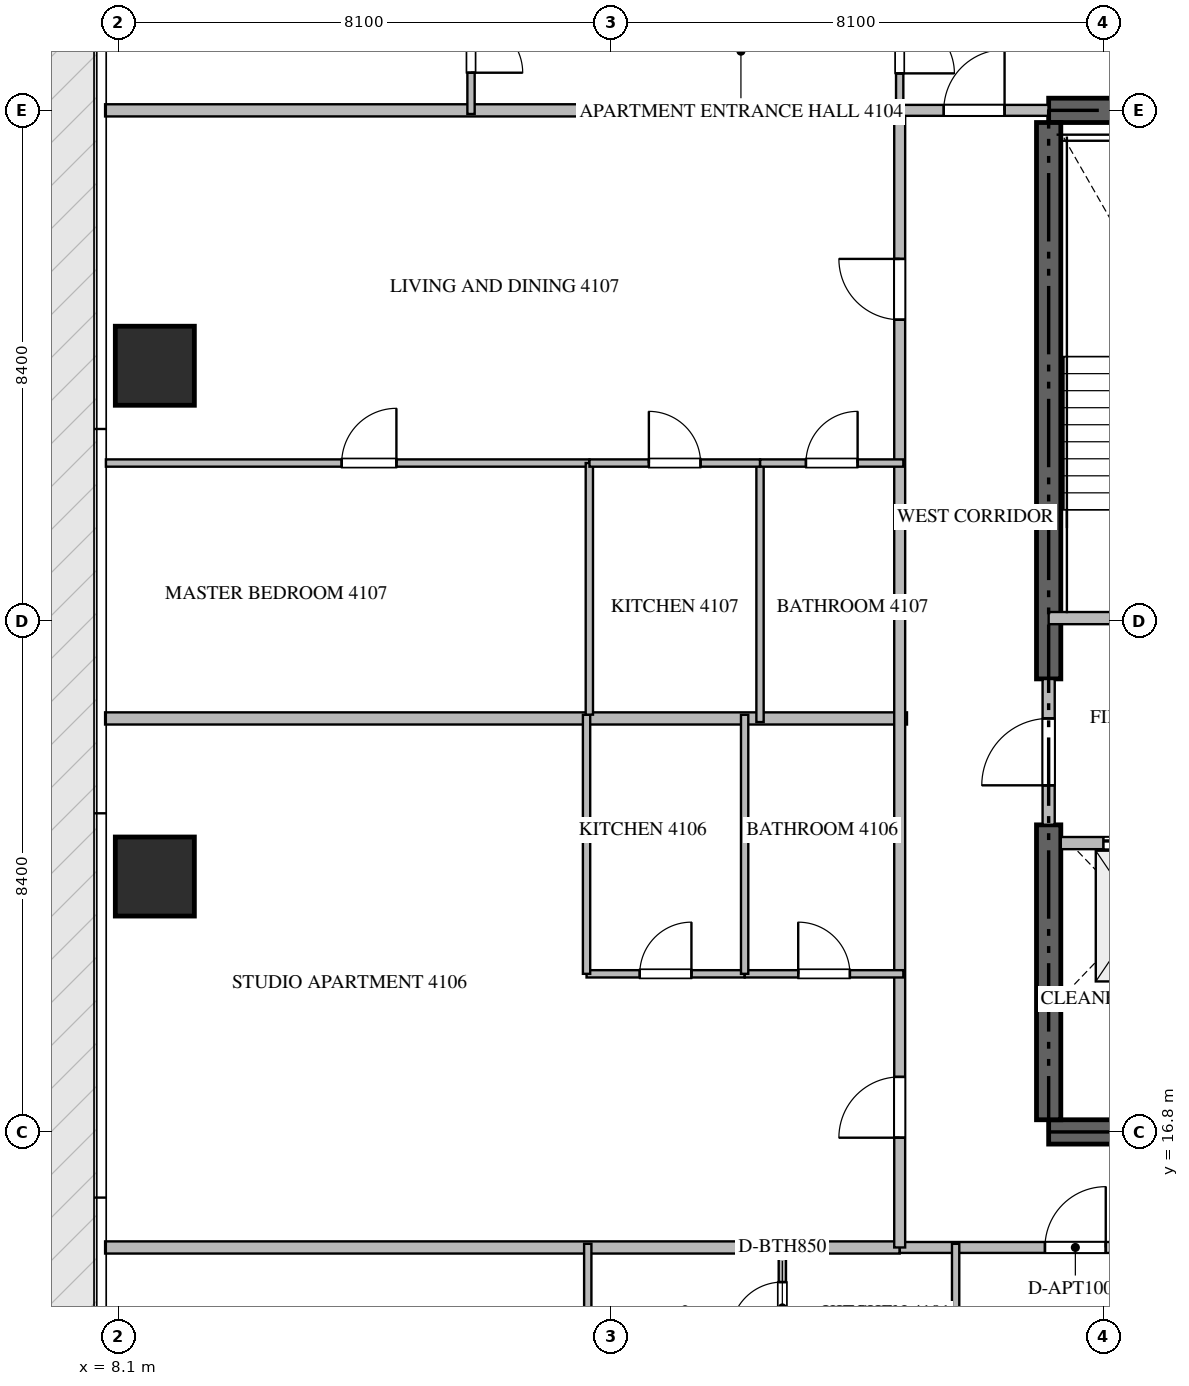
"""IFC4 building model, lengths in metres.
Left out: names, types, materials, properties, quantities, classifications, styles, units other than length and angle.
Written with IfcOpenShell. Run it as: python <this file> out.ifc"""

import sys

from ifc_helpers import new_model, si_unit, direction, frame, frame_2d, origin, origin_2d, place, context, subcontext, project, spatial, rectangle, extrude, source, transform, mapped, element, fill, save


model = new_model("IFC4")
c1 = context("Model", 3, precision=1e-05, world=origin(), true_north=direction((0.0, 1.0)))
c2 = subcontext(c1, "Body", "Model", "MODEL_VIEW")
j1 = project(units=[si_unit("LENGTHUNIT", "METRE"), si_unit("PLANEANGLEUNIT", "RADIAN")], contexts=[c1])
p1 = place(None, origin())
s1 = spatial("IfcSite", under=j1, at=p1, CompositionType="ELEMENT")
p2 = place(p1, origin())
s2 = spatial("IfcBuilding", under=s1, at=p2, CompositionType="ELEMENT")
p3 = place(p2, frame((0.0, 0.0, 165.15)))
s3 = spatial("IfcBuildingStorey", under=s2, at=p3, CompositionType="ELEMENT", Elevation=165.15)
for number, where, z_axis, x_axis in (
    (1, (23.4, 16.8, -0.26), (0.0, 0.0, 1.0), (1.0, 0.0, 0.0)),
    (2, (41.4, 33.6, -0.26), (0.0, 0.0, 1.0), (-1.0, 0.0, 0.0)),
):
    element("IfcWall", number, at=place(p3, frame(where, z_axis=z_axis, x_axis=x_axis)), inside=s3, PredefinedType="SHEAR", context=c2, shape_type="SweptSolid", body=[
        extrude(rectangle(XDim=18.0, YDim=0.4, at=frame_2d((9.0, 0.0))), origin(), (0.0, 0.0, 1.0), 3.748),
    ])
p4 = place(p3, frame((23.4, 17.0, -0.26), z_axis=(0.0, 0.0, 1.0), x_axis=(0.0, 1.0, 0.0)))
e3 = element("IfcWall", 3, at=p4, inside=s3, PredefinedType="SHEAR", context=c2, shape_type="SweptSolid", body=[
    extrude(rectangle(XDim=4.85, YDim=0.4, at=frame_2d((2.425, 0.0))), origin(), (0.0, 0.0, 1.0), 3.748),
])
p5 = place(p3, frame((23.4, 24.25, -0.26), z_axis=(0.0, 0.0, 1.0), x_axis=(0.0, 1.0, 0.0)))
e4 = element("IfcWall", 4, at=p5, inside=s3, PredefinedType="SHEAR", context=c2, shape_type="SweptSolid", body=[
    extrude(rectangle(XDim=9.15, YDim=0.4, at=frame_2d((4.575, 0.0))), origin(), (0.0, 0.0, 1.0), 3.748),
])
m1 = source(origin(), c2, "Body", "SweptSolid", [
    extrude(rectangle(XDim=1.3, YDim=1.3, at=origin_2d()), origin(), (0.0, 0.0, 1.0), 3.75),
])
for number, where, z_axis, x_axis in (
    (5, (8.7, 21.0, -0.26), (0.0, 0.0, 1.0), (1.0, 0.0, 0.0)),
    (6, (8.7, 29.4, -0.26), (0.0, 0.0, 1.0), (1.0, 0.0, 0.0)),
):
    element("IfcColumn", number, at=place(p3, frame(where, z_axis=z_axis, x_axis=x_axis)), inside=s3, PredefinedType="COLUMN", context=c2, shape_type="MappedRepresentation", body=[
        mapped(m1, transform((0.0, 0.0, 0.0), scale=1.0)),
    ])
p6 = place(p3, frame((23.4, 25.25, 0.0), z_axis=(0.0, 0.0, 1.0), x_axis=(1.0, 0.0, 0.0)))
e7 = element("IfcWall", 7, at=p6, inside=s3, PredefinedType="STANDARD", context=c2, shape_type="SweptSolid", body=[
    extrude(rectangle(XDim=4.45, YDim=0.2, at=frame_2d((2.225, 0.0))), origin(), (0.0, 0.0, 1.0), 3.49),
])
p7 = place(p6, frame((1.65, 0.0, 0.0)))
e8 = element("IfcOpeningElement", 8, at=p7, cuts=e7, PredefinedType="OPENING", context=c2, shape_type="SweptSolid", body=[
    extrude(rectangle(XDim=1.1, YDim=2.15, at=frame_2d((0.55, 1.075))), frame((0.0, 0.11, 0.0), z_axis=(0.0, -1.0, 0.0), x_axis=(1.0, 0.0, 0.0)), (0.0, 0.0, 1.0), 0.22),
])
p8 = place(p3, frame((23.6, 21.55, 0.0), z_axis=(0.0, 0.0, 1.0), x_axis=(1.0, 0.0, 0.0)))
e9 = element("IfcWall", 9, at=p8, inside=s3, PredefinedType="STANDARD", context=c2, shape_type="SweptSolid", body=[
    extrude(rectangle(XDim=2.45, YDim=0.2, at=frame_2d((1.225, 0.0))), origin(), (0.0, 0.0, 1.0), 3.49),
])
p9 = place(p8, frame((0.7, 0.0, 0.0)))
e10 = element("IfcOpeningElement", 10, at=p9, cuts=e9, PredefinedType="OPENING", context=c2, shape_type="SweptSolid", body=[
    extrude(rectangle(XDim=1.2, YDim=2.2, at=frame_2d((0.6, 1.1))), frame((0.0, 0.11, 0.0), z_axis=(0.0, -1.0, 0.0), x_axis=(1.0, 0.0, 0.0)), (0.0, 0.0, 1.0), 0.22),
])
p10 = place(p3, frame((23.6, 19.05, 0.0), z_axis=(0.0, 0.0, 1.0), x_axis=(1.0, 0.0, 0.0)))
e11 = element("IfcWall", 11, at=p10, inside=s3, PredefinedType="STANDARD", context=c2, shape_type="SweptSolid", body=[
    extrude(rectangle(XDim=2.45, YDim=0.2, at=frame_2d((1.225, 0.0))), origin(), (0.0, 0.0, 1.0), 3.49),
])
p11 = place(p3, frame((23.4, 21.852, 0.0), z_axis=(0.0, 0.0, 1.0), x_axis=(0.0, 1.0, 0.0)))
e12 = element("IfcWall", 12, at=p11, inside=s3, PredefinedType="STANDARD", context=c2, shape_type="SweptSolid", body=[
    extrude(rectangle(XDim=2.396, YDim=0.2, at=frame_2d((1.198, 0.0))), origin(), (0.0, 0.0, 1.0), 3.49),
])
p12 = place(p11, frame((0.648, 0.0, 0.0)))
e13 = element("IfcOpeningElement", 13, at=p12, cuts=e12, PredefinedType="OPENING", context=c2, shape_type="SweptSolid", body=[
    extrude(rectangle(XDim=1.1, YDim=2.15, at=frame_2d((0.55, 1.075))), frame((0.0, 0.11, 0.0), z_axis=(0.0, -1.0, 0.0), x_axis=(1.0, 0.0, 0.0)), (0.0, 0.0, 1.0), 0.22),
])
p13 = place(p3, frame((7.882, 23.6, 0.0), z_axis=(0.0, 0.0, 1.0), x_axis=(1.0, 0.0, 0.0)))
e14 = element("IfcWall", 14, at=p13, inside=s3, PredefinedType="PARTITIONING", context=c2, shape_type="SweptSolid", body=[
    extrude(rectangle(XDim=13.188, YDim=0.2, at=frame_2d((6.594, 0.0))), origin(), (0.0, 0.0, 1.0), 3.49),
])
for number, where, z_axis, x_axis in (
    (15, (7.882, 14.9, 0.0), (0.0, 0.0, 1.0), (1.0, 0.0, 0.0)),
    (16, (7.882, 33.6, 0.0), (0.0, 0.0, 1.0), (1.0, 0.0, 0.0)),
):
    element("IfcWall", number, at=place(p3, frame(where, z_axis=z_axis, x_axis=x_axis)), inside=s3, PredefinedType="PARTITIONING", context=c2, shape_type="SweptSolid", body=[
        extrude(rectangle(XDim=13.068, YDim=0.2, at=frame_2d((6.534, 0.0))), origin(), (0.0, 0.0, 1.0), 3.49),
    ])
p14 = place(p3, frame((20.952, 14.9, 0.0), z_axis=(0.0, 0.0, 1.0), x_axis=(1.0, 0.0, 0.0)))
e17 = element("IfcWall", 17, at=p14, inside=s3, PredefinedType="PARTITIONING", context=c2, shape_type="SweptSolid", body=[
    extrude(rectangle(XDim=22.896, YDim=0.18, at=frame_2d((11.448, 0.0))), origin(), (0.0, 0.0, 1.0), 3.49),
])
p15 = place(p14, frame((2.387, 0.0, 0.0)))
e18 = element("IfcOpeningElement", 18, at=p15, cuts=e17, PredefinedType="OPENING", context=c2, shape_type="SweptSolid", body=[
    extrude(rectangle(XDim=1.0, YDim=2.15, at=frame_2d((0.5, 1.075))), frame((0.0, 0.1, 0.0), z_axis=(0.0, -1.0, 0.0), x_axis=(1.0, 0.0, 0.0)), (0.0, 0.0, 1.0), 0.2),
])
p16 = place(p14, frame((6.788, 0.0, 0.0)))
e19 = element("IfcOpeningElement", 19, at=p16, cuts=e17, PredefinedType="OPENING", context=c2, shape_type="SweptSolid", body=[
    extrude(rectangle(XDim=1.0, YDim=2.15, at=frame_2d((0.5, 1.075))), frame((0.0, 0.1, 0.0), z_axis=(0.0, -1.0, 0.0), x_axis=(1.0, 0.0, 0.0)), (0.0, 0.0, 1.0), 0.2),
])
p17 = place(p14, frame((19.181, 0.0, 0.0)))
e20 = element("IfcOpeningElement", 20, at=p17, cuts=e17, PredefinedType="OPENING", context=c2, shape_type="SweptSolid", body=[
    extrude(rectangle(XDim=1.0, YDim=2.15, at=frame_2d((0.5, 1.075))), frame((0.0, 0.1, 0.0), z_axis=(0.0, -1.0, 0.0), x_axis=(1.0, 0.0, 0.0)), (0.0, 0.0, 1.0), 0.2),
])
p18 = place(p3, frame((20.95, 14.9, 0.0), z_axis=(0.0, 0.0, 1.0), x_axis=(0.0, 1.0, 0.0)))
e21 = element("IfcWall", 21, at=p18, inside=s3, PredefinedType="PARTITIONING", context=c2, shape_type="SweptSolid", body=[
    extrude(rectangle(XDim=18.7, YDim=0.18, at=frame_2d((9.35, 0.0))), origin(), (0.0, 0.0, 1.0), 3.49),
])
p19 = place(p18, frame((1.805, 0.0, 0.0)))
e22 = element("IfcOpeningElement", 22, at=p19, cuts=e21, PredefinedType="OPENING", context=c2, shape_type="SweptSolid", body=[
    extrude(rectangle(XDim=1.0, YDim=2.15, at=frame_2d((0.5, 1.075))), frame((0.0, 0.1, 0.0), z_axis=(0.0, -1.0, 0.0), x_axis=(1.0, 0.0, 0.0)), (0.0, 0.0, 1.0), 0.2),
])
p20 = place(p18, frame((15.257, 0.0, 0.0)))
e23 = element("IfcOpeningElement", 23, at=p20, cuts=e21, PredefinedType="OPENING", context=c2, shape_type="SweptSolid", body=[
    extrude(rectangle(XDim=1.0, YDim=2.15, at=frame_2d((0.5, 1.075))), frame((0.0, 0.1, 0.0), z_axis=(0.0, -1.0, 0.0), x_axis=(1.0, 0.0, 0.0)), (0.0, 0.0, 1.0), 0.2),
])
p21 = place(p3, frame((20.952, 33.6, 0.0), z_axis=(0.0, 0.0, 1.0), x_axis=(1.0, 0.0, 0.0)))
e24 = element("IfcWall", 24, at=p21, inside=s3, PredefinedType="PARTITIONING", context=c2, shape_type="SweptSolid", body=[
    extrude(rectangle(XDim=2.446, YDim=0.18, at=frame_2d((1.223, 0.0))), origin(), (0.0, 0.0, 1.0), 3.49),
])
p22 = place(p21, frame((0.723, 0.0, 0.0)))
e25 = element("IfcOpeningElement", 25, at=p22, cuts=e24, PredefinedType="OPENING", context=c2, shape_type="SweptSolid", body=[
    extrude(rectangle(XDim=1.0, YDim=2.15, at=frame_2d((0.5, 1.075))), frame((0.0, 0.1, 0.0), z_axis=(0.0, -1.0, 0.0), x_axis=(1.0, 0.0, 0.0)), (0.0, 0.0, 1.0), 0.2),
])
p23 = place(p3, frame((21.87, 12.15, 0.0), z_axis=(0.0, 0.0, 1.0), x_axis=(0.0, 1.0, 0.0)))
e26 = element("IfcWall", 26, at=p23, inside=s3, PredefinedType="PARTITIONING", context=c2, shape_type="SweptSolid", body=[
    extrude(rectangle(XDim=2.81, YDim=0.12, at=frame_2d((1.405, 0.0))), origin(), (0.0, 0.0, 1.0), 3.49),
])
p24 = place(p3, frame((15.82, 12.85, 0.0), z_axis=(0.0, 0.0, 1.0), x_axis=(0.0, 1.0, 0.0)))
e27 = element("IfcWall", 27, at=p24, inside=s3, PredefinedType="PARTITIONING", context=c2, shape_type="SweptSolid", body=[
    extrude(rectangle(XDim=2.11, YDim=0.12, at=frame_2d((1.055, 0.0))), origin(), (0.0, 0.0, 1.0), 3.49),
])
p25 = place(p3, frame((19.02, 12.852, 0.0), z_axis=(0.0, 0.0, 1.0), x_axis=(0.0, 1.0, 0.0)))
e28 = element("IfcWall", 28, at=p25, inside=s3, PredefinedType="PARTITIONING", context=c2, shape_type="SweptSolid", body=[
    extrude(rectangle(XDim=2.108, YDim=0.12, at=frame_2d((1.054, 0.0))), origin(), (0.0, 0.0, 1.0), 3.49),
])
p26 = place(p25, frame((0.629, 0.0, 0.0)))
e29 = element("IfcOpeningElement", 29, at=p26, cuts=e28, PredefinedType="OPENING", context=c2, shape_type="SweptSolid", body=[
    extrude(rectangle(XDim=0.85, YDim=2.1, at=frame_2d((0.425, 1.05))), frame((0.0, 0.07, 0.0), z_axis=(0.0, -1.0, 0.0), x_axis=(1.0, 0.0, 0.0)), (0.0, 0.0, 1.0), 0.14),
])
p27 = place(p3, frame((20.95, 35.75, 0.0), z_axis=(0.0, 0.0, 1.0), x_axis=(0.0, -1.0, 0.0)))
e30 = element("IfcWall", 30, at=p27, inside=s3, PredefinedType="PARTITIONING", context=c2, shape_type="SweptSolid", body=[
    extrude(rectangle(XDim=2.148, YDim=0.12, at=frame_2d((1.074, 0.0))), origin(), (0.0, 0.0, 1.0), 3.49),
])
p28 = place(p27, frame((0.642, 0.0, 0.0)))
e31 = element("IfcOpeningElement", 31, at=p28, cuts=e30, PredefinedType="OPENING", context=c2, shape_type="SweptSolid", body=[
    extrude(rectangle(XDim=0.9, YDim=2.1, at=frame_2d((0.45, 1.05))), frame((0.0, 0.07, 0.0), z_axis=(0.0, -1.0, 0.0), x_axis=(1.0, 0.0, 0.0)), (0.0, 0.0, 1.0), 0.14),
])
p29 = place(p3, frame((13.9, 35.748, 0.0), z_axis=(0.0, 0.0, 1.0), x_axis=(0.0, -1.0, 0.0)))
e32 = element("IfcWall", 32, at=p29, inside=s3, PredefinedType="PARTITIONING", context=c2, shape_type="SweptSolid", body=[
    extrude(rectangle(XDim=2.208, YDim=0.12, at=frame_2d((1.104, 0.0))), origin(), (0.0, 0.0, 1.0), 3.49),
])
p30 = place(p29, frame((0.679, 0.0, 0.0)))
e33 = element("IfcOpeningElement", 33, at=p30, cuts=e32, PredefinedType="OPENING", context=c2, shape_type="SweptSolid", body=[
    extrude(rectangle(XDim=0.85, YDim=2.1, at=frame_2d((0.425, 1.05))), frame((0.0, 0.07, 0.0), z_axis=(0.0, -1.0, 0.0), x_axis=(1.0, 0.0, 0.0)), (0.0, 0.0, 1.0), 0.14),
])
p31 = place(p3, frame((15.8, 19.4, 0.0), z_axis=(0.0, 0.0, 1.0), x_axis=(1.0, 0.0, 0.0)))
e34 = element("IfcWall", 34, at=p31, inside=s3, PredefinedType="PARTITIONING", context=c2, shape_type="SweptSolid", body=[
    extrude(rectangle(XDim=2.6, YDim=0.12, at=frame_2d((1.3, 0.0))), origin(), (0.0, 0.0, 1.0), 3.49),
])
p32 = place(p31, frame((0.875, 0.0, 0.0)))
e35 = element("IfcOpeningElement", 35, at=p32, cuts=e34, PredefinedType="OPENING", context=c2, shape_type="SweptSolid", body=[
    extrude(rectangle(XDim=0.85, YDim=2.1, at=frame_2d((0.425, 1.05))), frame((0.0, 0.07, 0.0), z_axis=(0.0, -1.0, 0.0), x_axis=(1.0, 0.0, 0.0)), (0.0, 0.0, 1.0), 0.14),
])
p33 = place(p3, frame((18.402, 19.4, 0.0), z_axis=(0.0, 0.0, 1.0), x_axis=(1.0, 0.0, 0.0)))
e36 = element("IfcWall", 36, at=p33, inside=s3, PredefinedType="PARTITIONING", context=c2, shape_type="SweptSolid", body=[
    extrude(rectangle(XDim=2.608, YDim=0.12, at=frame_2d((1.304, 0.0))), origin(), (0.0, 0.0, 1.0), 3.49),
])
p34 = place(p33, frame((0.879, 0.0, 0.0)))
e37 = element("IfcOpeningElement", 37, at=p34, cuts=e36, PredefinedType="OPENING", context=c2, shape_type="SweptSolid", body=[
    extrude(rectangle(XDim=0.85, YDim=2.1, at=frame_2d((0.425, 1.05))), frame((0.0, 0.07, 0.0), z_axis=(0.0, -1.0, 0.0), x_axis=(1.0, 0.0, 0.0)), (0.0, 0.0, 1.0), 0.14),
])
for number, where, z_axis, x_axis in (
    (38, (18.4, 19.4, 0.0), (0.0, 0.0, 1.0), (0.0, 1.0, 0.0)),
    (39, (15.8, 19.4, 0.0), (0.0, 0.0, 1.0), (0.0, 1.0, 0.0)),
):
    element("IfcWall", number, at=place(p3, frame(where, z_axis=z_axis, x_axis=x_axis)), inside=s3, PredefinedType="PARTITIONING", context=c2, shape_type="SweptSolid", body=[
        extrude(rectangle(XDim=4.26, YDim=0.12, at=frame_2d((2.13, 0.0))), origin(), (0.0, 0.0, 1.0), 3.49),
    ])
p35 = place(p3, frame((7.895, 27.8, 0.0), z_axis=(0.0, 0.0, 1.0), x_axis=(1.0, 0.0, 0.0)))
e40 = element("IfcWall", 40, at=p35, inside=s3, PredefinedType="PARTITIONING", context=c2, shape_type="SweptSolid", body=[
    extrude(rectangle(XDim=7.951, YDim=0.12, at=frame_2d((3.976, 0.0))), origin(), (0.0, 0.0, 1.0), 3.49),
])
p36 = place(p35, frame((3.878, 0.0, 0.0)))
e41 = element("IfcOpeningElement", 41, at=p36, cuts=e40, PredefinedType="OPENING", context=c2, shape_type="SweptSolid", body=[
    extrude(rectangle(XDim=0.9, YDim=2.1, at=frame_2d((0.45, 1.05))), frame((0.0, 0.07, 0.0), z_axis=(0.0, -1.0, 0.0), x_axis=(1.0, 0.0, 0.0)), (0.0, 0.0, 1.0), 0.14),
])
p37 = place(p3, frame((15.846, 23.662, 0.0), z_axis=(0.0, 0.0, 1.0), x_axis=(0.0, 1.0, 0.0)))
e42 = element("IfcWall", 42, at=p37, inside=s3, PredefinedType="PARTITIONING", context=c2, shape_type="SweptSolid", body=[
    extrude(rectangle(XDim=4.138, YDim=0.12, at=frame_2d((2.069, 0.0))), origin(), (0.0, 0.0, 1.0), 3.49),
])
p38 = place(p3, frame((18.653, 23.54, 0.0), z_axis=(0.0, 0.0, 1.0), x_axis=(0.0, 1.0, 0.0)))
e43 = element("IfcWall", 43, at=p38, inside=s3, PredefinedType="PARTITIONING", context=c2, shape_type="SweptSolid", body=[
    extrude(rectangle(XDim=4.26, YDim=0.12, at=frame_2d((2.13, 0.0))), origin(), (0.0, 0.0, 1.0), 3.49),
])
p39 = place(p3, frame((15.848, 27.8, 0.0), z_axis=(0.0, 0.0, 1.0), x_axis=(1.0, 0.0, 0.0)))
e44 = element("IfcWall", 44, at=p39, inside=s3, PredefinedType="PARTITIONING", context=c2, shape_type="SweptSolid", body=[
    extrude(rectangle(XDim=2.805, YDim=0.12, at=frame_2d((1.403, 0.0))), origin(), (0.0, 0.0, 1.0), 3.49),
])
p40 = place(p39, frame((0.977, 0.0, 0.0)))
e45 = element("IfcOpeningElement", 45, at=p40, cuts=e44, PredefinedType="OPENING", context=c2, shape_type="SweptSolid", body=[
    extrude(rectangle(XDim=0.85, YDim=2.1, at=frame_2d((0.425, 1.05))), frame((0.0, 0.07, 0.0), z_axis=(0.0, -1.0, 0.0), x_axis=(1.0, 0.0, 0.0)), (0.0, 0.0, 1.0), 0.14),
])
p41 = place(p3, frame((18.655, 27.8, 0.0), z_axis=(0.0, 0.0, 1.0), x_axis=(1.0, 0.0, 0.0)))
e46 = element("IfcWall", 46, at=p41, inside=s3, PredefinedType="PARTITIONING", context=c2, shape_type="SweptSolid", body=[
    extrude(rectangle(XDim=2.355, YDim=0.12, at=frame_2d((1.177, 0.0))), origin(), (0.0, 0.0, 1.0), 3.49),
])
p42 = place(p41, frame((0.753, 0.0, 0.0)))
e47 = element("IfcOpeningElement", 47, at=p42, cuts=e46, PredefinedType="OPENING", context=c2, shape_type="SweptSolid", body=[
    extrude(rectangle(XDim=0.85, YDim=2.1, at=frame_2d((0.425, 1.05))), frame((0.0, 0.07, 0.0), z_axis=(0.0, -1.0, 0.0), x_axis=(1.0, 0.0, 0.0)), (0.0, 0.0, 1.0), 0.14),
])
m2 = source(origin(), c2, "Body", "SweptSolid", [
    extrude(rectangle(XDim=1.2, YDim=2.2, at=frame_2d((0.6, 1.1))), frame((0.0, 0.025, 0.0), z_axis=(0.0, -1.0, 0.0), x_axis=(1.0, 0.0, 0.0)), (0.0, 0.0, 1.0), 0.05),
])
p43 = place(p9, origin())
e48 = element("IfcDoor", 48, at=p43, inside=s3, OperationType="DOUBLE_DOOR_SLIDING", PredefinedType="DOOR", context=c2, shape_type="MappedRepresentation", body=[
    mapped(m2, transform((0.0, 0.0, 0.0), scale=1.0)),
])
fill(e10, e48)
m3 = source(origin(), c2, "Body", "SweptSolid", [
    extrude(rectangle(XDim=1.1, YDim=2.15, at=frame_2d((0.55, 1.075))), frame((0.0, 0.025, 0.0), z_axis=(0.0, -1.0, 0.0), x_axis=(1.0, 0.0, 0.0)), (0.0, 0.0, 1.0), 0.05),
])
p44 = place(p12, origin())
e49 = element("IfcDoor", 49, at=p44, inside=s3, OperationType="SINGLE_SWING_LEFT", PredefinedType="DOOR", context=c2, shape_type="MappedRepresentation", body=[
    mapped(m3, transform((0.0, 0.0, 0.0), scale=1.0)),
])
fill(e13, e49)
m4 = source(origin(), c2, "Body", "SweptSolid", [
    extrude(rectangle(XDim=1.0, YDim=2.15, at=frame_2d((0.5, 1.075))), frame((0.0, 0.025, 0.0), z_axis=(0.0, -1.0, 0.0), x_axis=(1.0, 0.0, 0.0)), (0.0, 0.0, 1.0), 0.05),
])
p45 = place(p15, origin())
e50 = element("IfcDoor", 50, at=p45, inside=s3, OperationType="SINGLE_SWING_RIGHT", PredefinedType="DOOR", context=c2, shape_type="MappedRepresentation", body=[
    mapped(m4, transform((0.0, 0.0, 0.0), scale=1.0)),
])
fill(e18, e50)
p46 = place(p19, origin())
e51 = element("IfcDoor", 51, at=p46, inside=s3, OperationType="SINGLE_SWING_LEFT", PredefinedType="DOOR", context=c2, shape_type="MappedRepresentation", body=[
    mapped(m4, transform((0.0, 0.0, 0.0), scale=1.0)),
])
fill(e22, e51)
p47 = place(p20, origin())
e52 = element("IfcDoor", 52, at=p47, inside=s3, OperationType="SINGLE_SWING_RIGHT", PredefinedType="DOOR", context=c2, shape_type="MappedRepresentation", body=[
    mapped(m4, transform((0.0, 0.0, 0.0), scale=1.0)),
])
fill(e23, e52)
p48 = place(p22, origin())
e53 = element("IfcDoor", 53, at=p48, inside=s3, OperationType="SINGLE_SWING_RIGHT", PredefinedType="DOOR", context=c2, shape_type="MappedRepresentation", body=[
    mapped(m4, transform((0.0, 0.0, 0.0), scale=1.0)),
])
fill(e25, e53)
m5 = source(origin(), c2, "Body", "SweptSolid", [
    extrude(rectangle(XDim=0.85, YDim=2.1, at=frame_2d((0.425, 1.05))), frame((0.0, 0.025, 0.0), z_axis=(0.0, -1.0, 0.0), x_axis=(1.0, 0.0, 0.0)), (0.0, 0.0, 1.0), 0.05),
])
p49 = place(p26, origin())
e54 = element("IfcDoor", 54, at=p49, inside=s3, OperationType="SINGLE_SWING_LEFT", PredefinedType="DOOR", context=c2, shape_type="MappedRepresentation", body=[
    mapped(m5, transform((0.0, 0.0, 0.0), scale=1.0)),
])
fill(e29, e54)
m6 = source(origin(), c2, "Body", "SweptSolid", [
    extrude(rectangle(XDim=0.9, YDim=2.1, at=frame_2d((0.45, 1.05))), frame((0.0, 0.025, 0.0), z_axis=(0.0, -1.0, 0.0), x_axis=(1.0, 0.0, 0.0)), (0.0, 0.0, 1.0), 0.05),
])
p50 = place(p28, origin())
e55 = element("IfcDoor", 55, at=p50, inside=s3, OperationType="SINGLE_SWING_RIGHT", PredefinedType="DOOR", context=c2, shape_type="MappedRepresentation", body=[
    mapped(m6, transform((0.0, 0.0, 0.0), scale=1.0)),
])
fill(e31, e55)
p51 = place(p30, origin())
e56 = element("IfcDoor", 56, at=p51, inside=s3, OperationType="SINGLE_SWING_RIGHT", PredefinedType="DOOR", context=c2, shape_type="MappedRepresentation", body=[
    mapped(m5, transform((0.0, 0.0, 0.0), scale=1.0)),
])
fill(e33, e56)
p52 = place(p32, origin())
e57 = element("IfcDoor", 57, at=p52, inside=s3, OperationType="SINGLE_SWING_RIGHT", PredefinedType="DOOR", context=c2, shape_type="MappedRepresentation", body=[
    mapped(m5, transform((0.0, 0.0, 0.0), scale=1.0)),
])
fill(e35, e57)
p53 = place(p34, origin())
e58 = element("IfcDoor", 58, at=p53, inside=s3, OperationType="SINGLE_SWING_LEFT", PredefinedType="DOOR", context=c2, shape_type="MappedRepresentation", body=[
    mapped(m5, transform((0.0, 0.0, 0.0), scale=1.0)),
])
fill(e37, e58)
p54 = place(p36, origin())
e59 = element("IfcDoor", 59, at=p54, inside=s3, OperationType="SINGLE_SWING_RIGHT", PredefinedType="DOOR", context=c2, shape_type="MappedRepresentation", body=[
    mapped(m6, transform((0.0, 0.0, 0.0), scale=1.0)),
])
fill(e41, e59)
p55 = place(p40, origin())
e60 = element("IfcDoor", 60, at=p55, inside=s3, OperationType="SINGLE_SWING_LEFT", PredefinedType="DOOR", context=c2, shape_type="MappedRepresentation", body=[
    mapped(m5, transform((0.0, 0.0, 0.0), scale=1.0)),
])
fill(e45, e60)
p56 = place(p42, origin())
e61 = element("IfcDoor", 61, at=p56, inside=s3, OperationType="SINGLE_SWING_RIGHT", PredefinedType="DOOR", context=c2, shape_type="MappedRepresentation", body=[
    mapped(m5, transform((0.0, 0.0, 0.0), scale=1.0)),
])
fill(e47, e61)
save(model, sys.argv[1])
